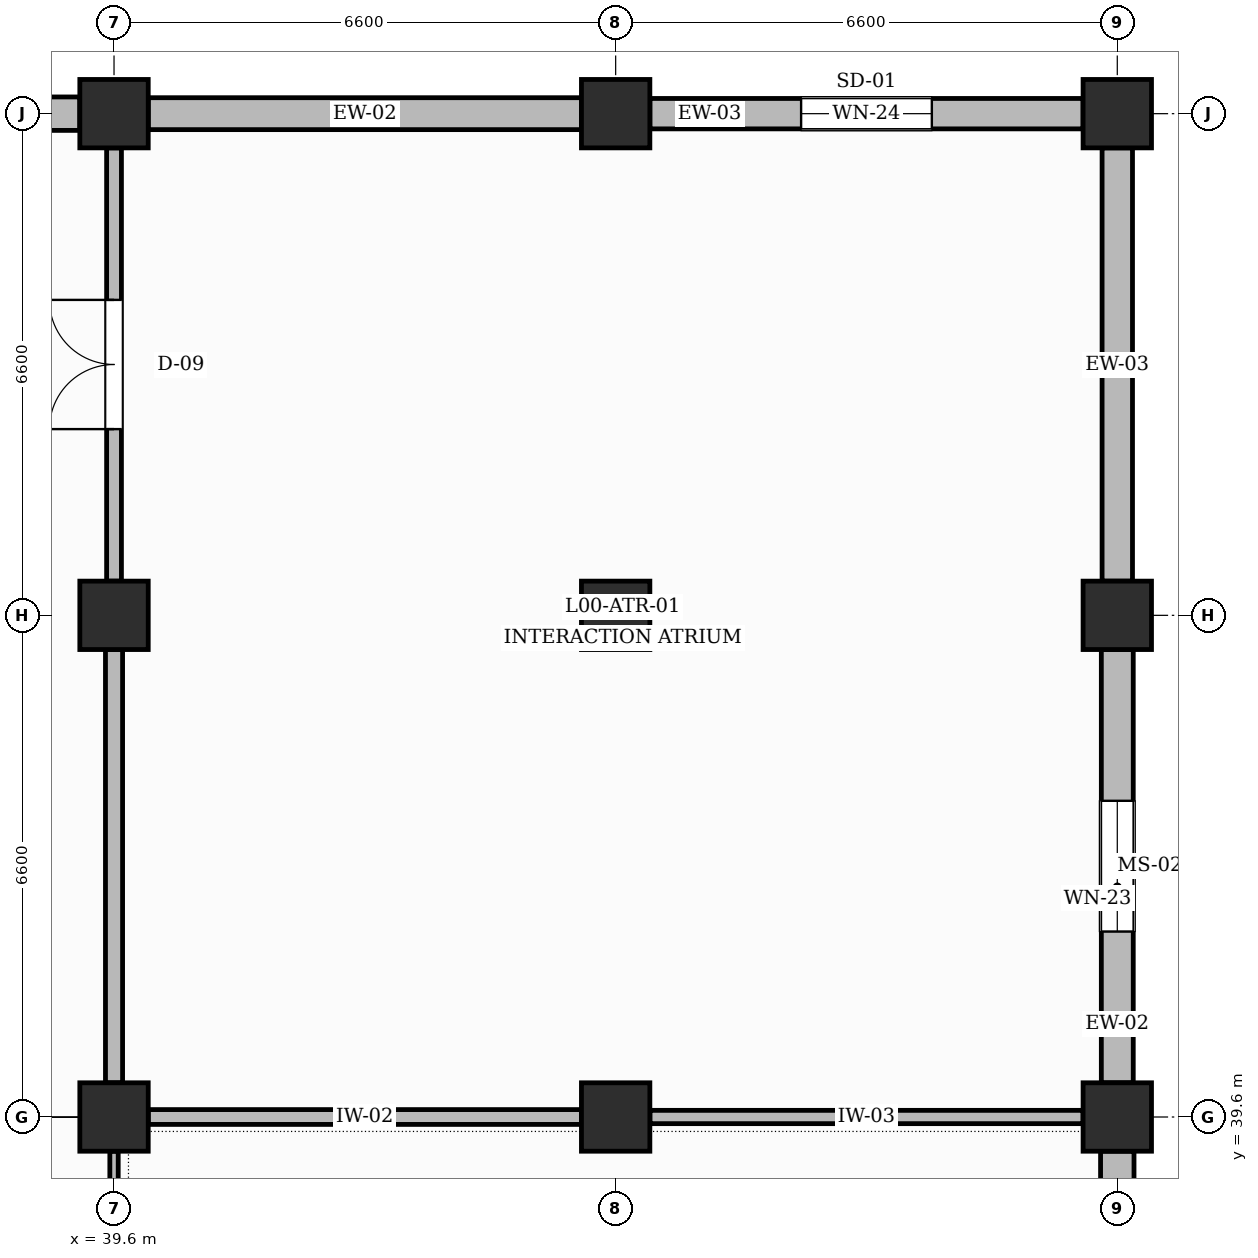
"""IFC4 building model, lengths in metres.
Left out: names, types, materials, properties, quantities, classifications, styles, units other than length and angle.
Written with IfcOpenShell. Run it as: python <this file> out.ifc"""

import sys

from ifc_helpers import new_model, si_unit, direction, frame, frame_2d, origin, origin_2d, place, context, subcontext, project, spatial, rectangle, extrude, element, fill, save


model = new_model("IFC4")
c1 = context("Model", 3, precision=1e-05, world=origin(), true_north=direction((0.0, 1.0)))
c2 = subcontext(c1, "Body", "Model", "MODEL_VIEW")
j1 = project(units=[si_unit("LENGTHUNIT", "METRE"), si_unit("PLANEANGLEUNIT", "RADIAN")], contexts=[c1])
p1 = place(None, origin())
s1 = spatial("IfcSite", under=j1, at=p1, CompositionType="ELEMENT")
p2 = place(p1, origin())
s2 = spatial("IfcBuilding", under=s1, at=p2, CompositionType="ELEMENT")
p3 = place(p2, origin())
s3 = spatial("IfcBuildingStorey", under=s2, at=p3, CompositionType="ELEMENT", Elevation=0.0)
for number, where, z_axis, x_axis in (
    (1, (39.6, 39.6, 0.0), (0.0, 0.0, 1.0), (1.0, 0.0, 0.0)),
    (2, (39.6, 46.2, 0.0), (0.0, 0.0, 1.0), (1.0, 0.0, 0.0)),
    (3, (39.6, 52.8, 0.0), (0.0, 0.0, 1.0), (1.0, 0.0, 0.0)),
    (4, (46.2, 39.6, 0.0), (0.0, 0.0, 1.0), (1.0, 0.0, 0.0)),
    (5, (46.2, 46.2, 0.0), (0.0, 0.0, 1.0), (1.0, 0.0, 0.0)),
    (6, (46.2, 52.8, 0.0), (0.0, 0.0, 1.0), (1.0, 0.0, 0.0)),
    (7, (52.8, 39.6, 0.0), (0.0, 0.0, 1.0), (1.0, 0.0, 0.0)),
    (8, (52.8, 46.2, 0.0), (0.0, 0.0, 1.0), (1.0, 0.0, 0.0)),
    (9, (52.8, 52.8, 0.0), (0.0, 0.0, 1.0), (1.0, 0.0, 0.0)),
):
    element("IfcColumn", number, at=place(p3, frame(where, z_axis=z_axis, x_axis=x_axis)), inside=s3, PredefinedType="COLUMN", context=c2, shape_type="SweptSolid", body=[
        extrude(rectangle(XDim=0.9, YDim=0.9, at=origin_2d()), origin(), (0.0, 0.0, 1.0), 5.4),
    ])
p4 = place(p3, frame((33.45, 52.8, 0.0), z_axis=(0.0, 0.0, 1.0), x_axis=(1.0, 0.0, 0.0)))
e10 = element("IfcWall", 10, at=p4, inside=s3, PredefinedType="SOLIDWALL", context=c2, shape_type="SweptSolid", body=[
    extrude(rectangle(XDim=5.7, YDim=0.44, at=frame_2d((2.85, 0.0))), origin(), (0.0, 0.0, 1.0), 4.45),
])
p5 = place(p4, frame((2.09, 0.0, 0.95)))
e11 = element("IfcOpeningElement", 11, at=p5, cuts=e10, PredefinedType="OPENING", context=c2, shape_type="SweptSolid", body=[
    extrude(rectangle(XDim=1.52, YDim=1.96, at=frame_2d((0.76, 0.98))), frame((0.0, 0.23, 0.0), z_axis=(0.0, -1.0, 0.0), x_axis=(1.0, 0.0, 0.0)), (0.0, 0.0, 1.0), 0.46),
])
p6 = place(p3, frame((40.05, 52.8, 0.0), z_axis=(0.0, 0.0, 1.0), x_axis=(1.0, 0.0, 0.0)))
e12 = element("IfcWall", 12, at=p6, inside=s3, PredefinedType="SOLIDWALL", context=c2, shape_type="SweptSolid", body=[
    extrude(rectangle(XDim=5.7, YDim=0.42, at=frame_2d((2.85, 0.0))), origin(), (0.0, 0.0, 1.0), 4.8),
])
p7 = place(p3, frame((52.8, 33.45, 0.0), z_axis=(0.0, 0.0, 1.0), x_axis=(0.0, 1.0, 0.0)))
e13 = element("IfcWall", 13, at=p7, inside=s3, PredefinedType="SOLIDWALL", context=c2, shape_type="SweptSolid", body=[
    extrude(rectangle(XDim=5.7, YDim=0.44, at=frame_2d((2.85, 0.0))), origin(), (0.0, 0.0, 1.0), 4.45),
])
p8 = place(p7, frame((1.99, 0.0, 0.95)))
e14 = element("IfcOpeningElement", 14, at=p8, cuts=e13, PredefinedType="OPENING", context=c2, shape_type="SweptSolid", body=[
    extrude(rectangle(XDim=1.72, YDim=1.52, at=frame_2d((0.86, 0.76))), frame((0.0, 0.23, 0.0), z_axis=(0.0, -1.0, 0.0), x_axis=(1.0, 0.0, 0.0)), (0.0, 0.0, 1.0), 0.46),
])
p9 = place(p3, frame((52.8, 40.05, 0.0), z_axis=(0.0, 0.0, 1.0), x_axis=(0.0, 1.0, 0.0)))
e15 = element("IfcWall", 15, at=p9, inside=s3, PredefinedType="SOLIDWALL", context=c2, shape_type="SweptSolid", body=[
    extrude(rectangle(XDim=5.7, YDim=0.42, at=frame_2d((2.85, 0.0))), origin(), (0.0, 0.0, 1.0), 4.8),
])
p10 = place(p9, frame((1.99, 0.0, 0.95)))
e16 = element("IfcOpeningElement", 16, at=p10, cuts=e15, PredefinedType="OPENING", context=c2, shape_type="SweptSolid", body=[
    extrude(rectangle(XDim=1.72, YDim=1.74, at=frame_2d((0.86, 0.87))), frame((0.0, 0.22, 0.0), z_axis=(0.0, -1.0, 0.0), x_axis=(1.0, 0.0, 0.0)), (0.0, 0.0, 1.0), 0.44),
])
p11 = place(p3, frame((46.65, 52.8, 0.0), z_axis=(0.0, 0.0, 1.0), x_axis=(1.0, 0.0, 0.0)))
e17 = element("IfcWall", 17, at=p11, inside=s3, PredefinedType="SOLIDWALL", context=c2, shape_type="SweptSolid", body=[
    extrude(rectangle(XDim=5.7, YDim=0.4, at=frame_2d((2.85, 0.0))), origin(), (0.0, 0.0, 1.0), 4.8),
])
p12 = place(p11, frame((1.99, 0.0, 0.95)))
e18 = element("IfcOpeningElement", 18, at=p12, cuts=e17, PredefinedType="OPENING", context=c2, shape_type="SweptSolid", body=[
    extrude(rectangle(XDim=1.72, YDim=1.96, at=frame_2d((0.86, 0.98))), frame((0.0, 0.21, 0.0), z_axis=(0.0, -1.0, 0.0), x_axis=(1.0, 0.0, 0.0)), (0.0, 0.0, 1.0), 0.42),
])
p13 = place(p3, frame((52.8, 46.65, 0.0), z_axis=(0.0, 0.0, 1.0), x_axis=(0.0, 1.0, 0.0)))
e19 = element("IfcWall", 19, at=p13, inside=s3, PredefinedType="SOLIDWALL", context=c2, shape_type="SweptSolid", body=[
    extrude(rectangle(XDim=5.7, YDim=0.4, at=frame_2d((2.85, 0.0))), origin(), (0.0, 0.0, 1.0), 4.8),
])
p14 = place(p3, frame((39.6, 33.45, 0.0), z_axis=(0.0, 0.0, 1.0), x_axis=(0.0, 1.0, 0.0)))
e20 = element("IfcWall", 20, at=p14, inside=s3, PredefinedType="PARTITIONING", context=c2, shape_type="SweptSolid", body=[
    extrude(rectangle(XDim=5.7, YDim=0.11, at=frame_2d((2.85, 0.0))), origin(), (0.0, 0.0, 1.0), 4.3),
])
p15 = place(p14, frame((2.26, 0.0, 0.0)))
e21 = element("IfcOpeningElement", 21, at=p15, cuts=e20, PredefinedType="OPENING", context=c2, shape_type="SweptSolid", body=[
    extrude(rectangle(XDim=1.18, YDim=2.2, at=frame_2d((0.59, 1.1))), frame((0.0, 0.065, 0.0), z_axis=(0.0, -1.0, 0.0), x_axis=(1.0, 0.0, 0.0)), (0.0, 0.0, 1.0), 0.13),
])
p16 = place(p3, frame((39.6, 40.05, 0.0), z_axis=(0.0, 0.0, 1.0), x_axis=(0.0, 1.0, 0.0)))
e22 = element("IfcWall", 22, at=p16, inside=s3, PredefinedType="PARTITIONING", context=c2, shape_type="SweptSolid", body=[
    extrude(rectangle(XDim=5.7, YDim=0.225, at=frame_2d((2.85, 0.0))), origin(), (0.0, 0.0, 1.0), 4.3),
])
p17 = place(p3, frame((39.6, 46.65, 0.0), z_axis=(0.0, 0.0, 1.0), x_axis=(0.0, 1.0, 0.0)))
e23 = element("IfcWall", 23, at=p17, inside=s3, PredefinedType="PARTITIONING", context=c2, shape_type="SweptSolid", body=[
    extrude(rectangle(XDim=5.7, YDim=0.195, at=frame_2d((2.85, 0.0))), origin(), (0.0, 0.0, 1.0), 4.3),
])
p18 = place(p17, frame((2.0, 0.0, 0.0)))
e24 = element("IfcOpeningElement", 24, at=p18, cuts=e23, PredefinedType="OPENING", context=c2, shape_type="SweptSolid", body=[
    extrude(rectangle(XDim=1.7, YDim=2.25, at=frame_2d((0.85, 1.125))), frame((0.0, 0.107, 0.0), z_axis=(0.0, -1.0, 0.0), x_axis=(1.0, 0.0, 0.0)), (0.0, 0.0, 1.0), 0.215),
])
p19 = place(p3, frame((40.05, 39.6, 0.0), z_axis=(0.0, 0.0, 1.0), x_axis=(1.0, 0.0, 0.0)))
e25 = element("IfcWall", 25, at=p19, inside=s3, PredefinedType="PARTITIONING", context=c2, shape_type="SweptSolid", body=[
    extrude(rectangle(XDim=5.7, YDim=0.195, at=frame_2d((2.85, 0.0))), origin(), (0.0, 0.0, 1.0), 4.2),
])
p20 = place(p3, frame((46.65, 39.6, 0.0), z_axis=(0.0, 0.0, 1.0), x_axis=(1.0, 0.0, 0.0)))
e26 = element("IfcWall", 26, at=p20, inside=s3, PredefinedType="PARTITIONING", context=c2, shape_type="SweptSolid", body=[
    extrude(rectangle(XDim=5.7, YDim=0.175, at=frame_2d((2.85, 0.0))), origin(), (0.0, 0.0, 1.0), 4.3),
])
p21 = place(p10, origin())
e27 = element("IfcWindow", 27, at=p21, inside=s3, PartitioningType="DOUBLE_PANEL_VERTICAL", PredefinedType="WINDOW", context=c2, shape_type="SweptSolid", body=[
    extrude(rectangle(XDim=1.72, YDim=1.74, at=frame_2d((0.86, 0.87))), frame((0.0, 0.03, 0.0), z_axis=(0.0, -1.0, 0.0), x_axis=(1.0, 0.0, 0.0)), (0.0, 0.0, 1.0), 0.06),
])
fill(e16, e27)
p22 = place(p12, origin())
e28 = element("IfcWindow", 28, at=p22, inside=s3, PartitioningType="DOUBLE_PANEL_VERTICAL", PredefinedType="WINDOW", context=c2, shape_type="SweptSolid", body=[
    extrude(rectangle(XDim=1.72, YDim=1.96, at=frame_2d((0.86, 0.98))), frame((0.0, 0.03, 0.0), z_axis=(0.0, -1.0, 0.0), x_axis=(1.0, 0.0, 0.0)), (0.0, 0.0, 1.0), 0.06),
])
fill(e18, e28)
p23 = place(p18, origin())
e29 = element("IfcDoor", 29, at=p23, inside=s3, OperationType="DOUBLE_DOOR_SINGLE_SWING", PredefinedType="DOOR", context=c2, shape_type="SweptSolid", body=[
    extrude(rectangle(XDim=1.7, YDim=2.25, at=frame_2d((0.85, 1.125))), frame((0.0, 0.025, 0.0), z_axis=(0.0, -1.0, 0.0), x_axis=(1.0, 0.0, 0.0)), (0.0, 0.0, 1.0), 0.05),
])
fill(e24, e29)
save(model, sys.argv[1])
